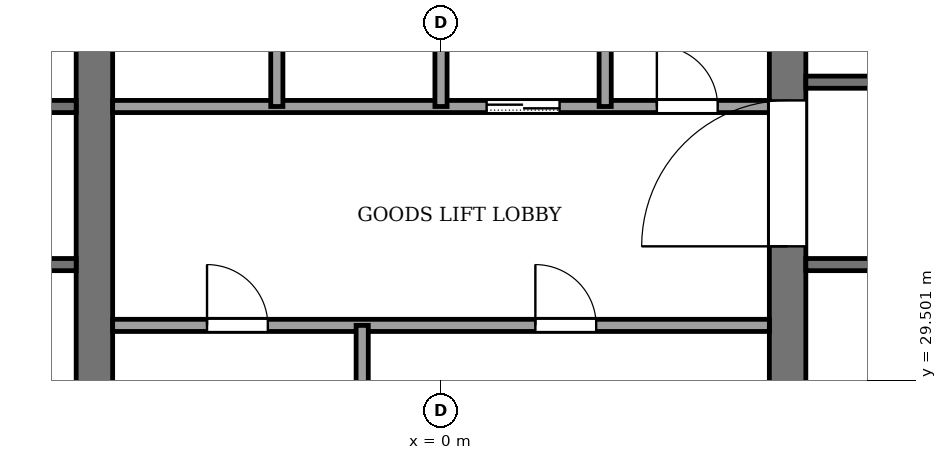
"""IFC4 building model, lengths in metres.
Left out: names, types, materials, properties, quantities, classifications, styles, units other than length and angle.
Written with IfcOpenShell. Run it as: python <this file> out.ifc"""

import sys

from ifc_helpers import new_model, si_unit, direction, frame, frame_2d, origin, place, context, subcontext, project, spatial, rectangle, extrude, element, fill, save


model = new_model("IFC4")
c1 = context("Model", 3, precision=1e-05, world=origin(), true_north=direction((0.0, 1.0)))
c2 = subcontext(c1, "Body", "Model", "MODEL_VIEW")
j1 = project(units=[si_unit("LENGTHUNIT", "METRE"), si_unit("PLANEANGLEUNIT", "RADIAN")], contexts=[c1])
p1 = place(None, origin())
s1 = spatial("IfcSite", under=j1, at=p1, CompositionType="ELEMENT")
p2 = place(p1, origin())
s2 = spatial("IfcBuilding", under=s1, at=p2, CompositionType="ELEMENT")
p3 = place(p2, frame((0.0, 0.0, 250.0)))
s3 = spatial("IfcBuildingStorey", under=s2, at=p3, CompositionType="ELEMENT", Elevation=250.0)
p4 = place(p3, frame((-5.7, 18.4, -0.13), z_axis=(0.0, 0.0, 1.0), x_axis=(0.0, 1.0, 0.0)))
e1 = element("IfcWall", 1, at=p4, inside=s3, PredefinedType="SHEAR", context=c2, shape_type="SweptSolid", body=[
    extrude(rectangle(XDim=19.2, YDim=0.6, at=frame_2d((9.6, 0.0))), origin(), (0.0, 0.0, 1.0), 4.0),
])
p5 = place(p4, frame((8.35, 0.0, 0.13)))
e2 = element("IfcOpeningElement", 2, at=p5, cuts=e1, PredefinedType="OPENING", context=c2, shape_type="SweptSolid", body=[
    extrude(rectangle(XDim=0.9, YDim=2.1, at=frame_2d((0.45, 1.05))), frame((0.0, 0.31, 0.0), z_axis=(0.0, -1.0, 0.0), x_axis=(1.0, 0.0, 0.0)), (0.0, 0.0, 1.0), 0.62),
])
p6 = place(p3, frame((5.7, 18.4, -0.13), z_axis=(0.0, 0.0, 1.0), x_axis=(0.0, 1.0, 0.0)))
e3 = element("IfcWall", 3, at=p6, inside=s3, PredefinedType="SHEAR", context=c2, shape_type="SweptSolid", body=[
    extrude(rectangle(XDim=19.2, YDim=0.6, at=frame_2d((9.6, 0.0))), origin(), (0.0, 0.0, 1.0), 4.0),
])
p7 = place(p6, frame((13.3, 0.0, 0.13)))
e4 = element("IfcOpeningElement", 4, at=p7, cuts=e3, PredefinedType="OPENING", context=c2, shape_type="SweptSolid", body=[
    extrude(rectangle(XDim=2.4, YDim=2.4, at=frame_2d((1.2, 1.2))), frame((0.0, 0.31, 0.0), z_axis=(0.0, -1.0, 0.0), x_axis=(1.0, 0.0, 0.0)), (0.0, 0.0, 1.0), 0.62),
])
p8 = place(p3, frame((-5.4, 30.4, 0.0), z_axis=(0.0, 0.0, 1.0), x_axis=(1.0, 0.0, 0.0)))
e5 = element("IfcWall", 5, at=p8, inside=s3, PredefinedType="PARTITIONING", context=c2, shape_type="SweptSolid", body=[
    extrude(rectangle(XDim=10.8, YDim=0.2, at=frame_2d((5.4, 0.0))), origin(), (0.0, 0.0, 1.0), 3.87),
])
p9 = place(p8, frame((1.552, 0.0, 0.0)))
e6 = element("IfcOpeningElement", 6, at=p9, cuts=e5, PredefinedType="OPENING", context=c2, shape_type="SweptSolid", body=[
    extrude(rectangle(XDim=1.0, YDim=2.1, at=frame_2d((0.5, 1.05))), frame((0.0, 0.11, 0.0), z_axis=(0.0, -1.0, 0.0), x_axis=(1.0, 0.0, 0.0)), (0.0, 0.0, 1.0), 0.22),
])
p10 = place(p8, frame((6.952, 0.0, 0.0)))
e7 = element("IfcOpeningElement", 7, at=p10, cuts=e5, PredefinedType="OPENING", context=c2, shape_type="SweptSolid", body=[
    extrude(rectangle(XDim=1.0, YDim=2.1, at=frame_2d((0.5, 1.05))), frame((0.0, 0.11, 0.0), z_axis=(0.0, -1.0, 0.0), x_axis=(1.0, 0.0, 0.0)), (0.0, 0.0, 1.0), 0.22),
])
p11 = place(p3, frame((-12.6, 31.4, 0.0), z_axis=(0.0, 0.0, 1.0), x_axis=(1.0, 0.0, 0.0)))
e8 = element("IfcWall", 8, at=p11, inside=s3, PredefinedType="PARTITIONING", context=c2, shape_type="SweptSolid", body=[
    extrude(rectangle(XDim=6.6, YDim=0.2, at=frame_2d((3.3, 0.0))), origin(), (0.0, 0.0, 1.0), 3.87),
])
p12 = place(p11, frame((1.0, 0.0, 0.0)))
e9 = element("IfcOpeningElement", 9, at=p12, cuts=e8, PredefinedType="OPENING", context=c2, shape_type="SweptSolid", body=[
    extrude(rectangle(XDim=1.2, YDim=2.2, at=frame_2d((0.6, 1.1))), frame((0.0, 0.11, 0.0), z_axis=(0.0, -1.0, 0.0), x_axis=(1.0, 0.0, 0.0)), (0.0, 0.0, 1.0), 0.22),
])
p13 = place(p3, frame((6.0, 31.4, 0.0), z_axis=(0.0, 0.0, 1.0), x_axis=(1.0, 0.0, 0.0)))
e10 = element("IfcWall", 10, at=p13, inside=s3, PredefinedType="PARTITIONING", context=c2, shape_type="SweptSolid", body=[
    extrude(rectangle(XDim=6.6, YDim=0.2, at=frame_2d((3.3, 0.0))), origin(), (0.0, 0.0, 1.0), 3.87),
])
p14 = place(p3, frame((-12.6, 34.0, 0.0), z_axis=(0.0, 0.0, 1.0), x_axis=(1.0, 0.0, 0.0)))
e11 = element("IfcWall", 11, at=p14, inside=s3, PredefinedType="PARTITIONING", context=c2, shape_type="SweptSolid", body=[
    extrude(rectangle(XDim=6.6, YDim=0.2, at=frame_2d((3.3, 0.0))), origin(), (0.0, 0.0, 1.0), 3.87),
])
p15 = place(p14, frame((4.7, 0.0, 0.0)))
e12 = element("IfcOpeningElement", 12, at=p15, cuts=e11, PredefinedType="OPENING", context=c2, shape_type="SweptSolid", body=[
    extrude(rectangle(XDim=1.4, YDim=2.2, at=frame_2d((0.7, 1.1))), frame((0.0, 0.11, 0.0), z_axis=(0.0, -1.0, 0.0), x_axis=(1.0, 0.0, 0.0)), (0.0, 0.0, 1.0), 0.22),
])
p16 = place(p14, frame((2.3, 0.0, 0.0)))
e13 = element("IfcOpeningElement", 13, at=p16, cuts=e11, PredefinedType="OPENING", context=c2, shape_type="SweptSolid", body=[
    extrude(rectangle(XDim=1.4, YDim=2.2, at=frame_2d((0.7, 1.1))), frame((0.0, 0.11, 0.0), z_axis=(0.0, -1.0, 0.0), x_axis=(1.0, 0.0, 0.0)), (0.0, 0.0, 1.0), 0.22),
])
p17 = place(p14, frame((0.45, 0.0, 0.0)))
e14 = element("IfcOpeningElement", 14, at=p17, cuts=e11, PredefinedType="OPENING", context=c2, shape_type="SweptSolid", body=[
    extrude(rectangle(XDim=0.9, YDim=2.1, at=frame_2d((0.45, 1.05))), frame((0.0, 0.11, 0.0), z_axis=(0.0, -1.0, 0.0), x_axis=(1.0, 0.0, 0.0)), (0.0, 0.0, 1.0), 0.22),
])
p18 = place(p3, frame((-5.4, 34.0, 0.0), z_axis=(0.0, 0.0, 1.0), x_axis=(1.0, 0.0, 0.0)))
e15 = element("IfcWall", 15, at=p18, inside=s3, PredefinedType="PARTITIONING", context=c2, shape_type="SweptSolid", body=[
    extrude(rectangle(XDim=10.8, YDim=0.2, at=frame_2d((5.4, 0.0))), origin(), (0.0, 0.0, 1.0), 3.87),
])
p19 = place(p18, frame((6.15, 0.0, 0.0)))
e16 = element("IfcOpeningElement", 16, at=p19, cuts=e15, PredefinedType="OPENING", context=c2, shape_type="SweptSolid", body=[
    extrude(rectangle(XDim=1.2, YDim=2.2, at=frame_2d((0.6, 1.1))), frame((0.0, 0.11, 0.0), z_axis=(0.0, -1.0, 0.0), x_axis=(1.0, 0.0, 0.0)), (0.0, 0.0, 1.0), 0.22),
])
p20 = place(p18, frame((8.95, 0.0, 0.0)))
e17 = element("IfcOpeningElement", 17, at=p20, cuts=e15, PredefinedType="OPENING", context=c2, shape_type="SweptSolid", body=[
    extrude(rectangle(XDim=1.0, YDim=2.1, at=frame_2d((0.5, 1.05))), frame((0.0, 0.11, 0.0), z_axis=(0.0, -1.0, 0.0), x_axis=(1.0, 0.0, 0.0)), (0.0, 0.0, 1.0), 0.22),
])
p21 = place(p3, frame((6.0, 34.4, 0.0), z_axis=(0.0, 0.0, 1.0), x_axis=(1.0, 0.0, 0.0)))
e18 = element("IfcWall", 18, at=p21, inside=s3, PredefinedType="PARTITIONING", context=c2, shape_type="SweptSolid", body=[
    extrude(rectangle(XDim=6.6, YDim=0.2, at=frame_2d((3.3, 0.0))), origin(), (0.0, 0.0, 1.0), 3.87),
])
p22 = place(p21, frame((4.8, 0.0, 0.0)))
e19 = element("IfcOpeningElement", 19, at=p22, cuts=e18, PredefinedType="OPENING", context=c2, shape_type="SweptSolid", body=[
    extrude(rectangle(XDim=1.2, YDim=2.2, at=frame_2d((0.6, 1.1))), frame((0.0, 0.11, 0.0), z_axis=(0.0, -1.0, 0.0), x_axis=(1.0, 0.0, 0.0)), (0.0, 0.0, 1.0), 0.22),
])
p23 = place(p3, frame((-2.7, 34.0, 0.0), z_axis=(0.0, 0.0, 1.0), x_axis=(0.0, 1.0, 0.0)))
e20 = element("IfcWall", 20, at=p23, inside=s3, PredefinedType="PARTITIONING", context=c2, shape_type="SweptSolid", body=[
    extrude(rectangle(XDim=3.6, YDim=0.2, at=frame_2d((1.8, 0.0))), origin(), (0.0, 0.0, 1.0), 3.87),
])
p24 = place(p3, frame((-1.296, 28.0, 0.0), z_axis=(0.0, 0.0, 1.0), x_axis=(0.0, 1.0, 0.0)))
e21 = element("IfcWall", 21, at=p24, inside=s3, PredefinedType="PARTITIONING", context=c2, shape_type="SweptSolid", body=[
    extrude(rectangle(XDim=2.4, YDim=0.2, at=frame_2d((1.2, 0.0))), origin(), (0.0, 0.0, 1.0), 3.87),
])
for number, where, z_axis, x_axis in (
    (22, (0.0, 34.0, 0.0), (0.0, 0.0, 1.0), (0.0, 1.0, 0.0)),
    (23, (2.7, 34.0, 0.0), (0.0, 0.0, 1.0), (0.0, 1.0, 0.0)),
):
    element("IfcWall", number, at=place(p3, frame(where, z_axis=z_axis, x_axis=x_axis)), inside=s3, PredefinedType="PARTITIONING", context=c2, shape_type="SweptSolid", body=[
        extrude(rectangle(XDim=3.6, YDim=0.2, at=frame_2d((1.8, 0.0))), origin(), (0.0, 0.0, 1.0), 3.87),
    ])
p25 = place(p19, origin())
e24 = element("IfcDoor", 24, at=p25, inside=s3, OperationType="SLIDING_TO_LEFT", PredefinedType="DOOR", context=c2, shape_type="SweptSolid", body=[
    extrude(rectangle(XDim=1.2, YDim=2.2, at=frame_2d((0.6, 1.1))), frame((0.0, 0.025, 0.0), z_axis=(0.0, -1.0, 0.0), x_axis=(1.0, 0.0, 0.0)), (0.0, 0.0, 1.0), 0.05),
])
fill(e16, e24)
p26 = place(p9, origin())
e25 = element("IfcDoor", 25, at=p26, inside=s3, OperationType="SINGLE_SWING_LEFT", PredefinedType="DOOR", context=c2, shape_type="SweptSolid", body=[
    extrude(rectangle(XDim=1.0, YDim=2.1, at=frame_2d((0.5, 1.05))), frame((0.0, 0.025, 0.0), z_axis=(0.0, -1.0, 0.0), x_axis=(1.0, 0.0, 0.0)), (0.0, 0.0, 1.0), 0.05),
])
fill(e6, e25)
p27 = place(p10, origin())
e26 = element("IfcDoor", 26, at=p27, inside=s3, OperationType="SINGLE_SWING_RIGHT", PredefinedType="DOOR", context=c2, shape_type="SweptSolid", body=[
    extrude(rectangle(XDim=1.0, YDim=2.1, at=frame_2d((0.5, 1.05))), frame((0.0, 0.025, 0.0), z_axis=(0.0, -1.0, 0.0), x_axis=(1.0, 0.0, 0.0)), (0.0, 0.0, 1.0), 0.05),
])
fill(e7, e26)
p28 = place(p20, origin())
e27 = element("IfcDoor", 27, at=p28, inside=s3, OperationType="SINGLE_SWING_LEFT", PredefinedType="DOOR", context=c2, shape_type="SweptSolid", body=[
    extrude(rectangle(XDim=1.0, YDim=2.1, at=frame_2d((0.5, 1.05))), frame((0.0, 0.025, 0.0), z_axis=(0.0, -1.0, 0.0), x_axis=(1.0, 0.0, 0.0)), (0.0, 0.0, 1.0), 0.05),
])
fill(e17, e27)
p29 = place(p7, origin())
e28 = element("IfcDoor", 28, at=p29, inside=s3, OperationType="DOUBLE_DOOR_SINGLE_SWING", PredefinedType="DOOR", context=c2, shape_type="SweptSolid", body=[
    extrude(rectangle(XDim=2.4, YDim=2.4, at=frame_2d((1.2, 1.2))), frame((0.0, 0.025, 0.0), z_axis=(0.0, -1.0, 0.0), x_axis=(1.0, 0.0, 0.0)), (0.0, 0.0, 1.0), 0.05),
])
fill(e4, e28)
save(model, sys.argv[1])
